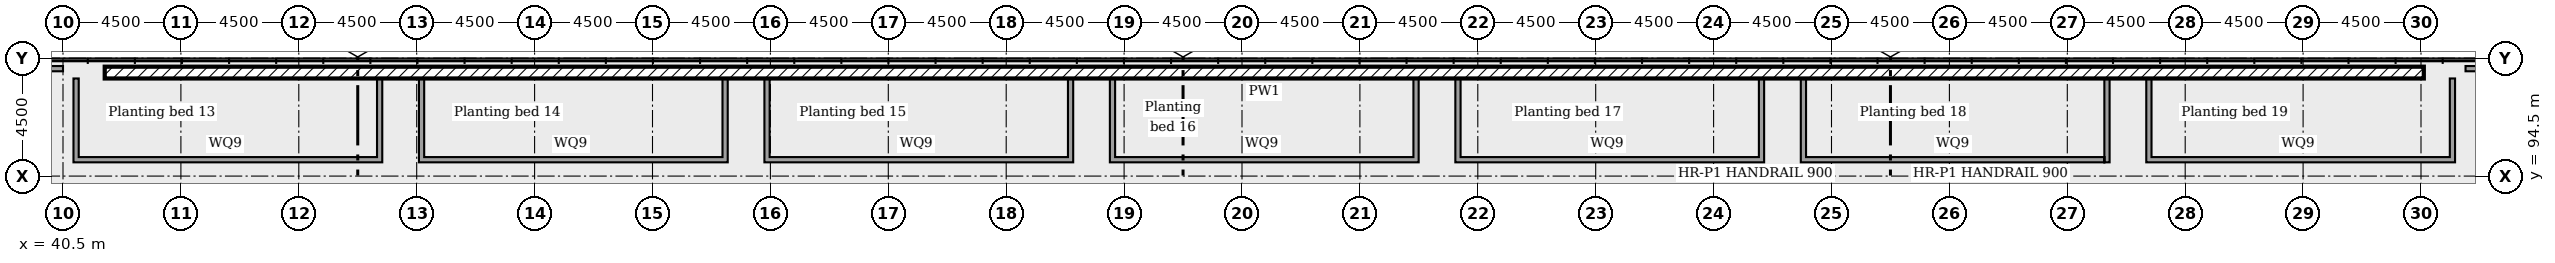
"""IFC4 building model, lengths in metres.
Left out: names, types, materials, properties, quantities, classifications, styles, units other than length and angle.
Written with IfcOpenShell. Run it as: python <this file> out.ifc"""

import sys

from ifc_helpers import new_model, si_unit, direction, frame, frame_2d, origin, place, context, subcontext, project, spatial, rectangle, extrude, element, save


model = new_model("IFC4")
c1 = context("Model", 3, precision=1e-05, world=origin(), true_north=direction((0.0, 1.0)))
c2 = subcontext(c1, "Body", "Model", "MODEL_VIEW")
j1 = project(units=[si_unit("LENGTHUNIT", "METRE"), si_unit("PLANEANGLEUNIT", "RADIAN")], contexts=[c1])
p1 = place(None, origin())
s1 = spatial("IfcSite", under=j1, at=p1, CompositionType="ELEMENT")
p2 = place(p1, origin())
s2 = spatial("IfcBuilding", under=s1, at=p2, CompositionType="ELEMENT")
p3 = place(p2, frame((0.0, 0.0, 6.0)))
s3 = spatial("IfcBuildingStorey", under=s2, at=p3, CompositionType="ELEMENT", Elevation=6.0)
p4 = place(p3, frame((130.607, 98.45, 0.0), z_axis=(0.0, 0.0, 1.0), x_axis=(-1.0, 0.0, 0.0)))
e1 = element("IfcWall", 1, at=p4, inside=s3, PredefinedType="SOLIDWALL", context=c2, shape_type="SweptSolid", body=[
    extrude(rectangle(XDim=88.515, YDim=0.45, at=frame_2d((44.257, 0.0))), origin(), (0.0, 0.0, 1.0), 0.6),
])
p5 = place(p3, frame((52.586, 95.025, 0.0), z_axis=(0.0, 0.0, 1.0), x_axis=(0.0, 1.0, 0.0)))
e2 = element("IfcWall", 2, at=p5, inside=s3, PredefinedType="SOLIDWALL", context=c2, shape_type="SweptSolid", body=[
    extrude(rectangle(XDim=3.2, YDim=0.2, at=frame_2d((1.6, 0.0))), origin(), (0.0, 0.0, 1.0), 0.45),
])
p6 = place(p3, frame((40.9, 95.125, 0.0)))
e3 = element("IfcWall", 3, at=p6, inside=s3, PredefinedType="SOLIDWALL", context=c2, shape_type="SweptSolid", body=[
    extrude(rectangle(XDim=11.586, YDim=0.2, at=frame_2d((5.793, 0.0))), origin(), (0.0, 0.0, 1.0), 0.45),
])
p7 = place(p3, frame((41.0, 95.225, 0.0), z_axis=(0.0, 0.0, 1.0), x_axis=(0.0, 1.0, 0.0)))
e4 = element("IfcWall", 4, at=p7, inside=s3, PredefinedType="SOLIDWALL", context=c2, shape_type="SweptSolid", body=[
    extrude(rectangle(XDim=3.0, YDim=0.2, at=frame_2d((1.5, 0.0))), origin(), (0.0, 0.0, 1.0), 0.45),
])
p8 = place(p3, frame((65.771, 95.025, 0.0), z_axis=(0.0, 0.0, 1.0), x_axis=(0.0, 1.0, 0.0)))
e5 = element("IfcWall", 5, at=p8, inside=s3, PredefinedType="SOLIDWALL", context=c2, shape_type="SweptSolid", body=[
    extrude(rectangle(XDim=3.2, YDim=0.2, at=frame_2d((1.6, 0.0))), origin(), (0.0, 0.0, 1.0), 0.45),
])
p9 = place(p3, frame((54.086, 95.125, 0.0)))
e6 = element("IfcWall", 6, at=p9, inside=s3, PredefinedType="SOLIDWALL", context=c2, shape_type="SweptSolid", body=[
    extrude(rectangle(XDim=11.586, YDim=0.2, at=frame_2d((5.793, 0.0))), origin(), (0.0, 0.0, 1.0), 0.45),
])
p10 = place(p3, frame((54.186, 95.225, 0.0), z_axis=(0.0, 0.0, 1.0), x_axis=(0.0, 1.0, 0.0)))
e7 = element("IfcWall", 7, at=p10, inside=s3, PredefinedType="SOLIDWALL", context=c2, shape_type="SweptSolid", body=[
    extrude(rectangle(XDim=3.0, YDim=0.2, at=frame_2d((1.5, 0.0))), origin(), (0.0, 0.0, 1.0), 0.45),
])
p11 = place(p3, frame((78.957, 95.025, 0.0), z_axis=(0.0, 0.0, 1.0), x_axis=(0.0, 1.0, 0.0)))
e8 = element("IfcWall", 8, at=p11, inside=s3, PredefinedType="SOLIDWALL", context=c2, shape_type="SweptSolid", body=[
    extrude(rectangle(XDim=3.2, YDim=0.2, at=frame_2d((1.6, 0.0))), origin(), (0.0, 0.0, 1.0), 0.45),
])
p12 = place(p3, frame((67.271, 95.125, 0.0)))
e9 = element("IfcWall", 9, at=p12, inside=s3, PredefinedType="SOLIDWALL", context=c2, shape_type="SweptSolid", body=[
    extrude(rectangle(XDim=11.586, YDim=0.2, at=frame_2d((5.793, 0.0))), origin(), (0.0, 0.0, 1.0), 0.45),
])
p13 = place(p3, frame((67.371, 95.225, 0.0), z_axis=(0.0, 0.0, 1.0), x_axis=(0.0, 1.0, 0.0)))
e10 = element("IfcWall", 10, at=p13, inside=s3, PredefinedType="SOLIDWALL", context=c2, shape_type="SweptSolid", body=[
    extrude(rectangle(XDim=3.0, YDim=0.2, at=frame_2d((1.5, 0.0))), origin(), (0.0, 0.0, 1.0), 0.45),
])
p14 = place(p3, frame((92.143, 95.025, 0.0), z_axis=(0.0, 0.0, 1.0), x_axis=(0.0, 1.0, 0.0)))
e11 = element("IfcWall", 11, at=p14, inside=s3, PredefinedType="SOLIDWALL", context=c2, shape_type="SweptSolid", body=[
    extrude(rectangle(XDim=3.2, YDim=0.2, at=frame_2d((1.6, 0.0))), origin(), (0.0, 0.0, 1.0), 0.45),
])
p15 = place(p3, frame((80.457, 95.125, 0.0)))
e12 = element("IfcWall", 12, at=p15, inside=s3, PredefinedType="SOLIDWALL", context=c2, shape_type="SweptSolid", body=[
    extrude(rectangle(XDim=11.586, YDim=0.2, at=frame_2d((5.793, 0.0))), origin(), (0.0, 0.0, 1.0), 0.45),
])
p16 = place(p3, frame((80.557, 95.225, 0.0), z_axis=(0.0, 0.0, 1.0), x_axis=(0.0, 1.0, 0.0)))
e13 = element("IfcWall", 13, at=p16, inside=s3, PredefinedType="SOLIDWALL", context=c2, shape_type="SweptSolid", body=[
    extrude(rectangle(XDim=3.0, YDim=0.2, at=frame_2d((1.5, 0.0))), origin(), (0.0, 0.0, 1.0), 0.45),
])
p17 = place(p3, frame((105.329, 95.025, 0.0), z_axis=(0.0, 0.0, 1.0), x_axis=(0.0, 1.0, 0.0)))
e14 = element("IfcWall", 14, at=p17, inside=s3, PredefinedType="SOLIDWALL", context=c2, shape_type="SweptSolid", body=[
    extrude(rectangle(XDim=3.2, YDim=0.2, at=frame_2d((1.6, 0.0))), origin(), (0.0, 0.0, 1.0), 0.45),
])
p18 = place(p3, frame((93.643, 95.125, 0.0)))
e15 = element("IfcWall", 15, at=p18, inside=s3, PredefinedType="SOLIDWALL", context=c2, shape_type="SweptSolid", body=[
    extrude(rectangle(XDim=11.586, YDim=0.2, at=frame_2d((5.793, 0.0))), origin(), (0.0, 0.0, 1.0), 0.45),
])
p19 = place(p3, frame((93.743, 95.225, 0.0), z_axis=(0.0, 0.0, 1.0), x_axis=(0.0, 1.0, 0.0)))
e16 = element("IfcWall", 16, at=p19, inside=s3, PredefinedType="SOLIDWALL", context=c2, shape_type="SweptSolid", body=[
    extrude(rectangle(XDim=3.0, YDim=0.2, at=frame_2d((1.5, 0.0))), origin(), (0.0, 0.0, 1.0), 0.45),
])
p20 = place(p3, frame((118.514, 95.025, 0.0), z_axis=(0.0, 0.0, 1.0), x_axis=(0.0, 1.0, 0.0)))
e17 = element("IfcWall", 17, at=p20, inside=s3, PredefinedType="SOLIDWALL", context=c2, shape_type="SweptSolid", body=[
    extrude(rectangle(XDim=3.2, YDim=0.2, at=frame_2d((1.6, 0.0))), origin(), (0.0, 0.0, 1.0), 0.45),
])
p21 = place(p3, frame((106.829, 95.125, 0.0)))
e18 = element("IfcWall", 18, at=p21, inside=s3, PredefinedType="SOLIDWALL", context=c2, shape_type="SweptSolid", body=[
    extrude(rectangle(XDim=11.586, YDim=0.2, at=frame_2d((5.793, 0.0))), origin(), (0.0, 0.0, 1.0), 0.45),
])
p22 = place(p3, frame((106.929, 95.225, 0.0), z_axis=(0.0, 0.0, 1.0), x_axis=(0.0, 1.0, 0.0)))
e19 = element("IfcWall", 19, at=p22, inside=s3, PredefinedType="SOLIDWALL", context=c2, shape_type="SweptSolid", body=[
    extrude(rectangle(XDim=3.0, YDim=0.2, at=frame_2d((1.5, 0.0))), origin(), (0.0, 0.0, 1.0), 0.45),
])
p23 = place(p3, frame((131.7, 95.025, 0.0), z_axis=(0.0, 0.0, 1.0), x_axis=(0.0, 1.0, 0.0)))
e20 = element("IfcWall", 20, at=p23, inside=s3, PredefinedType="SOLIDWALL", context=c2, shape_type="SweptSolid", body=[
    extrude(rectangle(XDim=3.2, YDim=0.2, at=frame_2d((1.6, 0.0))), origin(), (0.0, 0.0, 1.0), 0.45),
])
p24 = place(p3, frame((120.014, 95.125, 0.0)))
e21 = element("IfcWall", 21, at=p24, inside=s3, PredefinedType="SOLIDWALL", context=c2, shape_type="SweptSolid", body=[
    extrude(rectangle(XDim=11.586, YDim=0.2, at=frame_2d((5.793, 0.0))), origin(), (0.0, 0.0, 1.0), 0.45),
])
p25 = place(p3, frame((120.114, 95.225, 0.0), z_axis=(0.0, 0.0, 1.0), x_axis=(0.0, 1.0, 0.0)))
e22 = element("IfcWall", 22, at=p25, inside=s3, PredefinedType="SOLIDWALL", context=c2, shape_type="SweptSolid", body=[
    extrude(rectangle(XDim=3.0, YDim=0.2, at=frame_2d((1.5, 0.0))), origin(), (0.0, 0.0, 1.0), 0.45),
])
p26 = place(p3, frame((36.7, 98.6, 0.0)))
e23 = element("IfcWall", 23, at=p26, inside=s3, PredefinedType="SOLIDWALL", context=c2, shape_type="SweptSolid", body=[
    extrude(rectangle(XDim=3.8, YDim=0.2, at=frame_2d((1.9, 0.0))), origin(), (0.0, 0.0, 1.0), 2.3),
])
p27 = place(p26, frame((0.6, 0.0, 0.0)))
e24 = element("IfcOpeningElement", 24, at=p27, cuts=e23, PredefinedType="OPENING", context=c2, shape_type="SweptSolid", body=[
    extrude(rectangle(XDim=2.6, YDim=2.1, at=frame_2d((1.3, 1.05))), frame((0.0, 0.11, 0.0), z_axis=(0.0, -1.0, 0.0), x_axis=(1.0, 0.0, 0.0)), (0.0, 0.0, 1.0), 0.22),
])
p28 = place(p3, frame((132.2, 98.6, 0.0)))
e25 = element("IfcWall", 25, at=p28, inside=s3, PredefinedType="SOLIDWALL", context=c2, shape_type="SweptSolid", body=[
    extrude(rectangle(XDim=3.8, YDim=0.2, at=frame_2d((1.9, 0.0))), origin(), (0.0, 0.0, 1.0), 2.3),
])
p29 = place(p28, frame((0.6, 0.0, 0.0)))
e26 = element("IfcOpeningElement", 26, at=p29, cuts=e25, PredefinedType="OPENING", context=c2, shape_type="SweptSolid", body=[
    extrude(rectangle(XDim=2.6, YDim=2.1, at=frame_2d((1.3, 1.05))), frame((0.0, 0.11, 0.0), z_axis=(0.0, -1.0, 0.0), x_axis=(1.0, 0.0, 0.0)), (0.0, 0.0, 1.0), 0.22),
])
save(model, sys.argv[1])
